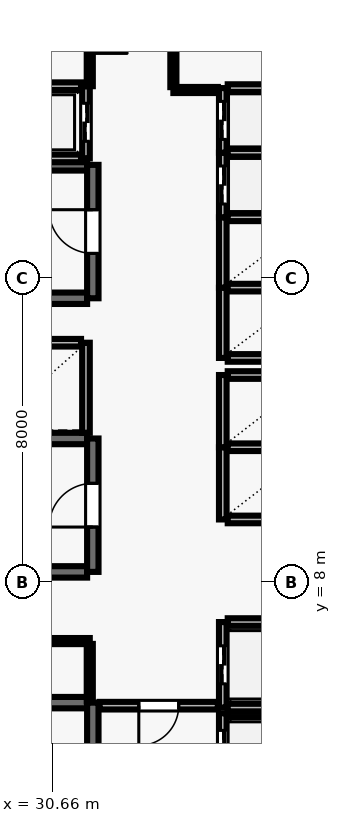
"""IFC4 building model, lengths in metres.
Left out: names, types, materials, properties, quantities, classifications, styles, units other than length and angle.
Written with IfcOpenShell. Run it as: python <this file> out.ifc"""

import sys

from ifc_helpers import new_model, si_unit, direction, frame, frame_2d, origin, place, context, subcontext, project, spatial, rectangle, extrude, element, fill, save


model = new_model("IFC4")
c1 = context("Model", 3, precision=1e-05, world=origin(), true_north=direction((0.0, 1.0)))
c2 = subcontext(c1, "Body", "Model", "MODEL_VIEW")
j1 = project(units=[si_unit("LENGTHUNIT", "METRE"), si_unit("PLANEANGLEUNIT", "RADIAN")], contexts=[c1])
p1 = place(None, origin())
s1 = spatial("IfcSite", under=j1, at=p1, CompositionType="ELEMENT")
p2 = place(p1, origin())
s2 = spatial("IfcBuilding", under=s1, at=p2, CompositionType="ELEMENT")
p3 = place(p2, frame((0.0, 0.0, 126.8)))
s3 = spatial("IfcBuildingStorey", under=s2, at=p3, CompositionType="ELEMENT", Elevation=126.8)
p4 = place(p3, frame((31.58, 4.83, 0.0), z_axis=(0.0, 0.0, 1.0), x_axis=(-1.0, 0.0, 0.0)))
e1 = element("IfcWall", 1, at=p4, inside=s3, PredefinedType="SHEAR", context=c2, shape_type="SweptSolid", body=[
    extrude(rectangle(XDim=8.36, YDim=0.3, at=frame_2d((4.18, 0.0))), origin(), (0.0, 0.0, 1.0), 3.69),
])
p5 = place(p3, frame((31.73, 0.96, 0.0), z_axis=(0.0, 0.0, 1.0), x_axis=(0.0, 1.0, 0.0)))
e2 = element("IfcWall", 2, at=p5, inside=s3, PredefinedType="SHEAR", context=c2, shape_type="SweptSolid", body=[
    extrude(rectangle(XDim=3.87, YDim=0.3, at=frame_2d((1.935, 0.0))), origin(), (0.0, 0.0, 1.0), 3.69),
])
p6 = place(p5, frame((1.54, 0.0, 0.0)))
e3 = element("IfcOpeningElement", 3, at=p6, cuts=e2, PredefinedType="OPENING", context=c2, shape_type="SweptSolid", body=[
    extrude(rectangle(XDim=1.15, YDim=2.15, at=frame_2d((0.575, 1.075))), frame((0.0, 0.16, 0.0), z_axis=(0.0, -1.0, 0.0), x_axis=(1.0, 0.0, 0.0)), (0.0, 0.0, 1.0), 0.32),
])
for number, where, z_axis, x_axis in (
    (4, (31.58, 18.98, 0.0), (0.0, 0.0, 1.0), (-1.0, 0.0, 0.0)),
    (5, (23.22, 15.47, 0.0), (0.0, 0.0, 1.0), (1.0, 0.0, 0.0)),
):
    element("IfcWall", number, at=place(p3, frame(where, z_axis=z_axis, x_axis=x_axis)), inside=s3, PredefinedType="SHEAR", context=c2, shape_type="SweptSolid", body=[
        extrude(rectangle(XDim=8.36, YDim=0.3, at=frame_2d((4.18, 0.0))), origin(), (0.0, 0.0, 1.0), 3.69),
    ])
p7 = place(p3, frame((31.73, 15.47, 0.0), z_axis=(0.0, 0.0, 1.0), x_axis=(0.0, 1.0, 0.0)))
e6 = element("IfcWall", 6, at=p7, inside=s3, PredefinedType="SHEAR", context=c2, shape_type="SweptSolid", body=[
    extrude(rectangle(XDim=3.51, YDim=0.3, at=frame_2d((1.755, 0.0))), origin(), (0.0, 0.0, 1.0), 3.69),
])
p8 = place(p7, frame((1.18, 0.0, 0.0)))
e7 = element("IfcOpeningElement", 7, at=p8, cuts=e6, PredefinedType="OPENING", context=c2, shape_type="SweptSolid", body=[
    extrude(rectangle(XDim=1.15, YDim=2.15, at=frame_2d((0.575, 1.075))), frame((0.0, 0.16, 0.0), z_axis=(0.0, -1.0, 0.0), x_axis=(1.0, 0.0, 0.0)), (0.0, 0.0, 1.0), 0.32),
])
for number, where, z_axis, x_axis in (
    (8, (31.58, 11.78, 0.0), (0.0, 0.0, 1.0), (-1.0, 0.0, 0.0)),
    (9, (23.22, 8.27, 0.0), (0.0, 0.0, 1.0), (1.0, 0.0, 0.0)),
):
    element("IfcWall", number, at=place(p3, frame(where, z_axis=z_axis, x_axis=x_axis)), inside=s3, PredefinedType="SHEAR", context=c2, shape_type="SweptSolid", body=[
        extrude(rectangle(XDim=8.36, YDim=0.3, at=frame_2d((4.18, 0.0))), origin(), (0.0, 0.0, 1.0), 3.69),
    ])
p9 = place(p3, frame((31.73, 8.27, 0.0), z_axis=(0.0, 0.0, 1.0), x_axis=(0.0, 1.0, 0.0)))
e10 = element("IfcWall", 10, at=p9, inside=s3, PredefinedType="SHEAR", context=c2, shape_type="SweptSolid", body=[
    extrude(rectangle(XDim=3.51, YDim=0.3, at=frame_2d((1.755, 0.0))), origin(), (0.0, 0.0, 1.0), 3.69),
])
p10 = place(p9, frame((1.18, 0.0, 0.0)))
e11 = element("IfcOpeningElement", 11, at=p10, cuts=e10, PredefinedType="OPENING", context=c2, shape_type="SweptSolid", body=[
    extrude(rectangle(XDim=1.15, YDim=2.15, at=frame_2d((0.575, 1.075))), frame((0.0, 0.16, 0.0), z_axis=(0.0, -1.0, 0.0), x_axis=(1.0, 0.0, 0.0)), (0.0, 0.0, 1.0), 0.32),
])
p11 = place(p3, frame((35.15, 4.55, 0.0), z_axis=(0.0, 0.0, 1.0), x_axis=(0.0, -1.0, 0.0)))
e12 = element("IfcWall", 12, at=p11, inside=s3, PredefinedType="SOLIDWALL", context=c2, shape_type="SweptSolid", body=[
    extrude(rectangle(XDim=2.1, YDim=0.2, at=frame_2d((1.05, 0.0))), origin(), (0.0, 0.0, 1.0), 3.69),
])
p12 = place(p11, frame((0.45, 0.0, 0.0)))
e13 = element("IfcOpeningElement", 13, at=p12, cuts=e12, PredefinedType="OPENING", context=c2, shape_type="SweptSolid", body=[
    extrude(rectangle(XDim=1.2, YDim=2.15, at=frame_2d((0.6, 1.075))), frame((0.0, 0.11, 0.0), z_axis=(0.0, -1.0, 0.0), x_axis=(1.0, 0.0, 0.0)), (0.0, 0.0, 1.0), 0.22),
])
p13 = place(p3, frame((37.42, 4.55, 0.0), z_axis=(0.0, 0.0, 1.0), x_axis=(-1.0, 0.0, 0.0)))
e14 = element("IfcWall", 14, at=p13, inside=s3, PredefinedType="SOLIDWALL", context=c2, shape_type="SweptSolid", body=[
    extrude(rectangle(XDim=2.14, YDim=0.2, at=frame_2d((1.07, 0.0))), origin(), (0.0, 0.0, 1.0), 3.69),
])
p14 = place(p3, frame((35.15, 6.95, 0.0), z_axis=(0.0, 0.0, 1.0), x_axis=(0.0, -1.0, 0.0)))
e15 = element("IfcWall", 15, at=p14, inside=s3, PredefinedType="SOLIDWALL", context=c2, shape_type="SweptSolid", body=[
    extrude(rectangle(XDim=2.25, YDim=0.2, at=frame_2d((1.125, 0.0))), origin(), (0.0, 0.0, 1.0), 3.69),
])
p15 = place(p14, frame((0.625, 0.0, 0.0)))
e16 = element("IfcOpeningElement", 16, at=p15, cuts=e15, PredefinedType="OPENING", context=c2, shape_type="SweptSolid", body=[
    extrude(rectangle(XDim=1.0, YDim=2.1, at=frame_2d((0.5, 1.05))), frame((0.0, 0.11, 0.0), z_axis=(0.0, -1.0, 0.0), x_axis=(1.0, 0.0, 0.0)), (0.0, 0.0, 1.0), 0.22),
])
for number, where, z_axis, x_axis in (
    (17, (35.28, 4.7, 0.0), (0.0, 0.0, 1.0), (1.0, 0.0, 0.0)),
    (18, (37.42, 6.95, 0.0), (0.0, 0.0, 1.0), (-1.0, 0.0, 0.0)),
):
    element("IfcWall", number, at=place(p3, frame(where, z_axis=z_axis, x_axis=x_axis)), inside=s3, PredefinedType="SOLIDWALL", context=c2, shape_type="SweptSolid", body=[
        extrude(rectangle(XDim=2.14, YDim=0.2, at=frame_2d((1.07, 0.0))), origin(), (0.0, 0.0, 1.0), 3.69),
    ])
p16 = place(p3, frame((35.15, 11.55, 0.0), z_axis=(0.0, 0.0, 1.0), x_axis=(0.0, -1.0, 0.0)))
e19 = element("IfcWall", 19, at=p16, inside=s3, PredefinedType="SOLIDWALL", context=c2, shape_type="SweptSolid", body=[
    extrude(rectangle(XDim=1.9, YDim=0.2, at=frame_2d((0.95, 0.0))), origin(), (0.0, 0.0, 1.0), 3.69),
])
for number, where, z_axis, x_axis in (
    (20, (35.28, 9.65, 0.0), (0.0, 0.0, 1.0), (1.0, 0.0, 0.0)),
    (21, (37.42, 11.55, 0.0), (0.0, 0.0, 1.0), (-1.0, 0.0, 0.0)),
):
    element("IfcWall", number, at=place(p3, frame(where, z_axis=z_axis, x_axis=x_axis)), inside=s3, PredefinedType="SOLIDWALL", context=c2, shape_type="SweptSolid", body=[
        extrude(rectangle(XDim=2.14, YDim=0.2, at=frame_2d((1.07, 0.0))), origin(), (0.0, 0.0, 1.0), 3.69),
    ])
p17 = place(p3, frame((35.15, 13.45, 0.0), z_axis=(0.0, 0.0, 1.0), x_axis=(0.0, -1.0, 0.0)))
e22 = element("IfcWall", 22, at=p17, inside=s3, PredefinedType="SOLIDWALL", context=c2, shape_type="SweptSolid", body=[
    extrude(rectangle(XDim=1.9, YDim=0.2, at=frame_2d((0.95, 0.0))), origin(), (0.0, 0.0, 1.0), 3.69),
])
p18 = place(p3, frame((37.42, 13.45, 0.0), z_axis=(0.0, 0.0, 1.0), x_axis=(-1.0, 0.0, 0.0)))
e23 = element("IfcWall", 23, at=p18, inside=s3, PredefinedType="SOLIDWALL", context=c2, shape_type="SweptSolid", body=[
    extrude(rectangle(XDim=2.14, YDim=0.2, at=frame_2d((1.07, 0.0))), origin(), (0.0, 0.0, 1.0), 3.69),
])
p19 = place(p3, frame((31.55, 11.93, 0.0), z_axis=(0.0, 0.0, 1.0), x_axis=(0.0, 1.0, 0.0)))
e24 = element("IfcWall", 24, at=p19, inside=s3, PredefinedType="SOLIDWALL", context=c2, shape_type="SweptSolid", body=[
    extrude(rectangle(XDim=2.37, YDim=0.2, at=frame_2d((1.185, 0.0))), origin(), (0.0, 0.0, 1.0), 3.69),
])
p20 = place(p3, frame((31.42, 14.3, 0.0), z_axis=(0.0, 0.0, 1.0), x_axis=(-1.0, 0.0, 0.0)))
e25 = element("IfcWall", 25, at=p20, inside=s3, PredefinedType="SOLIDWALL", context=c2, shape_type="SweptSolid", body=[
    extrude(rectangle(XDim=2.44, YDim=0.2, at=frame_2d((1.22, 0.0))), origin(), (0.0, 0.0, 1.0), 3.69),
])
p21 = place(p3, frame((35.15, 15.75, 0.0), z_axis=(0.0, 0.0, 1.0), x_axis=(0.0, -1.0, 0.0)))
e26 = element("IfcWall", 26, at=p21, inside=s3, PredefinedType="SOLIDWALL", context=c2, shape_type="SweptSolid", body=[
    extrude(rectangle(XDim=1.85, YDim=0.2, at=frame_2d((0.925, 0.0))), origin(), (0.0, 0.0, 1.0), 3.69),
])
for number, where, z_axis, x_axis in (
    (27, (35.28, 13.9, 0.0), (0.0, 0.0, 1.0), (1.0, 0.0, 0.0)),
    (28, (37.42, 15.75, 0.0), (0.0, 0.0, 1.0), (-1.0, 0.0, 0.0)),
):
    element("IfcWall", number, at=place(p3, frame(where, z_axis=z_axis, x_axis=x_axis)), inside=s3, PredefinedType="SOLIDWALL", context=c2, shape_type="SweptSolid", body=[
        extrude(rectangle(XDim=2.14, YDim=0.2, at=frame_2d((1.07, 0.0))), origin(), (0.0, 0.0, 1.0), 3.69),
    ])
p22 = place(p3, frame((35.15, 17.6, 0.0), z_axis=(0.0, 0.0, 1.0), x_axis=(0.0, -1.0, 0.0)))
e29 = element("IfcWall", 29, at=p22, inside=s3, PredefinedType="SOLIDWALL", context=c2, shape_type="SweptSolid", body=[
    extrude(rectangle(XDim=1.85, YDim=0.2, at=frame_2d((0.925, 0.0))), origin(), (0.0, 0.0, 1.0), 3.69),
])
p23 = place(p3, frame((37.42, 17.6, 0.0), z_axis=(0.0, 0.0, 1.0), x_axis=(-1.0, 0.0, 0.0)))
e30 = element("IfcWall", 30, at=p23, inside=s3, PredefinedType="SOLIDWALL", context=c2, shape_type="SweptSolid", body=[
    extrude(rectangle(XDim=2.14, YDim=0.2, at=frame_2d((1.07, 0.0))), origin(), (0.0, 0.0, 1.0), 3.69),
])
p24 = place(p3, frame((35.15, 19.3, 0.0), z_axis=(0.0, 0.0, 1.0), x_axis=(0.0, -1.0, 0.0)))
e31 = element("IfcWall", 31, at=p24, inside=s3, PredefinedType="SOLIDWALL", context=c2, shape_type="SweptSolid", body=[
    extrude(rectangle(XDim=1.7, YDim=0.2, at=frame_2d((0.85, 0.0))), origin(), (0.0, 0.0, 1.0), 3.69),
])
p25 = place(p24, frame((0.35, 0.0, 0.0)))
e32 = element("IfcOpeningElement", 32, at=p25, cuts=e31, PredefinedType="OPENING", context=c2, shape_type="SweptSolid", body=[
    extrude(rectangle(XDim=1.0, YDim=2.1, at=frame_2d((0.5, 1.05))), frame((0.0, 0.11, 0.0), z_axis=(0.0, -1.0, 0.0), x_axis=(1.0, 0.0, 0.0)), (0.0, 0.0, 1.0), 0.22),
])
p26 = place(p3, frame((37.42, 19.3, 0.0), z_axis=(0.0, 0.0, 1.0), x_axis=(-1.0, 0.0, 0.0)))
e33 = element("IfcWall", 33, at=p26, inside=s3, PredefinedType="SOLIDWALL", context=c2, shape_type="SweptSolid", body=[
    extrude(rectangle(XDim=2.14, YDim=0.2, at=frame_2d((1.07, 0.0))), origin(), (0.0, 0.0, 1.0), 3.69),
])
p27 = place(p3, frame((35.15, 21.0, 0.0), z_axis=(0.0, 0.0, 1.0), x_axis=(0.0, -1.0, 0.0)))
e34 = element("IfcWall", 34, at=p27, inside=s3, PredefinedType="SOLIDWALL", context=c2, shape_type="SweptSolid", body=[
    extrude(rectangle(XDim=1.7, YDim=0.2, at=frame_2d((0.85, 0.0))), origin(), (0.0, 0.0, 1.0), 3.69),
])
p28 = place(p27, frame((0.35, 0.0, 0.0)))
e35 = element("IfcOpeningElement", 35, at=p28, cuts=e34, PredefinedType="OPENING", context=c2, shape_type="SweptSolid", body=[
    extrude(rectangle(XDim=1.0, YDim=2.1, at=frame_2d((0.5, 1.05))), frame((0.0, 0.11, 0.0), z_axis=(0.0, -1.0, 0.0), x_axis=(1.0, 0.0, 0.0)), (0.0, 0.0, 1.0), 0.22),
])
p29 = place(p3, frame((37.42, 21.0, 0.0), z_axis=(0.0, 0.0, 1.0), x_axis=(-1.0, 0.0, 0.0)))
e36 = element("IfcWall", 36, at=p29, inside=s3, PredefinedType="SOLIDWALL", context=c2, shape_type="SweptSolid", body=[
    extrude(rectangle(XDim=2.14, YDim=0.2, at=frame_2d((1.07, 0.0))), origin(), (0.0, 0.0, 1.0), 3.69),
])
p30 = place(p3, frame((31.55, 19.15, 0.0), z_axis=(0.0, 0.0, 1.0), x_axis=(0.0, 1.0, 0.0)))
e37 = element("IfcWall", 37, at=p30, inside=s3, PredefinedType="SOLIDWALL", context=c2, shape_type="SweptSolid", body=[
    extrude(rectangle(XDim=1.9, YDim=0.2, at=frame_2d((0.95, 0.0))), origin(), (0.0, 0.0, 1.0), 3.69),
])
p31 = place(p30, frame((0.45, 0.0, 0.0)))
e38 = element("IfcOpeningElement", 38, at=p31, cuts=e37, PredefinedType="OPENING", context=c2, shape_type="SweptSolid", body=[
    extrude(rectangle(XDim=1.0, YDim=2.1, at=frame_2d((0.5, 1.05))), frame((0.0, 0.11, 0.0), z_axis=(0.0, -1.0, 0.0), x_axis=(1.0, 0.0, 0.0)), (0.0, 0.0, 1.0), 0.22),
])
for number, where, z_axis, x_axis in (
    (39, (28.98, 19.15, 0.0), (0.0, 0.0, 1.0), (1.0, 0.0, 0.0)),
    (40, (31.42, 21.05, 0.0), (0.0, 0.0, 1.0), (-1.0, 0.0, 0.0)),
):
    element("IfcWall", number, at=place(p3, frame(where, z_axis=z_axis, x_axis=x_axis)), inside=s3, PredefinedType="SOLIDWALL", context=c2, shape_type="SweptSolid", body=[
        extrude(rectangle(XDim=2.44, YDim=0.2, at=frame_2d((1.22, 0.0))), origin(), (0.0, 0.0, 1.0), 3.69),
    ])
p32 = place(p3, frame((28.55, 6.45, 0.0), z_axis=(0.0, 0.0, 1.0), x_axis=(1.0, 0.0, 0.0)))
e41 = element("IfcWall", 41, at=p32, inside=s3, PredefinedType="PARTITIONING", context=c2, shape_type="SweptSolid", body=[
    extrude(rectangle(XDim=3.1, YDim=0.16, at=frame_2d((1.55, 0.0))), origin(), (0.0, 0.0, 1.0), 3.69),
])
p33 = place(p32, frame((1.11, 0.0, 0.0)))
e42 = element("IfcOpeningElement", 42, at=p33, cuts=e41, PredefinedType="OPENING", context=c2, shape_type="SweptSolid", body=[
    extrude(rectangle(XDim=0.88, YDim=2.1, at=frame_2d((0.44, 1.05))), frame((0.0, 0.09, 0.0), z_axis=(0.0, -1.0, 0.0), x_axis=(1.0, 0.0, 0.0)), (0.0, 0.0, 1.0), 0.18),
])
p34 = place(p3, frame((35.02, 4.75, 0.0), z_axis=(0.0, 0.0, 1.0), x_axis=(-1.0, 0.0, 0.0)))
e43 = element("IfcWall", 43, at=p34, inside=s3, PredefinedType="SOLIDWALL", context=c2, shape_type="SweptSolid", body=[
    extrude(rectangle(XDim=3.11, YDim=0.2, at=frame_2d((1.555, 0.0))), origin(), (0.0, 0.0, 1.0), 3.69),
])
p35 = place(p34, frame((1.03, 0.0, 0.0)))
e44 = element("IfcOpeningElement", 44, at=p35, cuts=e43, PredefinedType="OPENING", context=c2, shape_type="SweptSolid", body=[
    extrude(rectangle(XDim=1.05, YDim=2.15, at=frame_2d((0.525, 1.075))), frame((0.0, 0.11, 0.0), z_axis=(0.0, -1.0, 0.0), x_axis=(1.0, 0.0, 0.0)), (0.0, 0.0, 1.0), 0.22),
])
p36 = place(p3, frame((35.02, 20.95, 0.0), z_axis=(0.0, 0.0, 1.0), x_axis=(-1.0, 0.0, 0.0)))
e45 = element("IfcWall", 45, at=p36, inside=s3, PredefinedType="PARTITIONING", context=c2, shape_type="SweptSolid", body=[
    extrude(rectangle(XDim=1.17, YDim=0.16, at=frame_2d((0.585, 0.0))), origin(), (0.0, 0.0, 1.0), 3.69),
])
p37 = place(p3, frame((31.65, 4.86, 0.0), z_axis=(0.0, 0.0, 1.0), x_axis=(0.0, 1.0, 0.0)))
e46 = element("IfcWall", 46, at=p37, inside=s3, PredefinedType="PARTITIONING", context=c2, shape_type="SweptSolid", body=[
    extrude(rectangle(XDim=1.515, YDim=0.16, at=frame_2d((0.757, 0.0))), origin(), (0.0, 0.0, 1.0), 3.69),
])
p38 = place(p3, frame((31.65, 23.775, 0.0), z_axis=(0.0, 0.0, 1.0), x_axis=(0.0, -1.0, 0.0)))
e47 = element("IfcWall", 47, at=p38, inside=s3, PredefinedType="PARTITIONING", context=c2, shape_type="SweptSolid", body=[
    extrude(rectangle(XDim=2.725, YDim=0.16, at=frame_2d((1.362, 0.0))), origin(), (0.0, 0.0, 1.0), 3.69),
])
p39 = place(p38, frame((0.862, 0.0, 0.0)))
e48 = element("IfcOpeningElement", 48, at=p39, cuts=e47, PredefinedType="OPENING", context=c2, shape_type="SweptSolid", body=[
    extrude(rectangle(XDim=1.0, YDim=2.1, at=frame_2d((0.5, 1.05))), frame((0.0, 0.09, 0.0), z_axis=(0.0, -1.0, 0.0), x_axis=(1.0, 0.0, 0.0)), (0.0, 0.0, 1.0), 0.18),
])
p40 = place(p3, frame((33.85, 21.025, 0.0), z_axis=(0.0, 0.0, 1.0), x_axis=(0.0, 1.0, 0.0)))
e49 = element("IfcWall", 49, at=p40, inside=s3, PredefinedType="PARTITIONING", context=c2, shape_type="SweptSolid", body=[
    extrude(rectangle(XDim=2.75, YDim=0.16, at=frame_2d((1.375, 0.0))), origin(), (0.0, 0.0, 1.0), 3.69),
])
p41 = place(p8, origin())
e50 = element("IfcDoor", 50, at=p41, inside=s3, OperationType="SINGLE_SWING_RIGHT", PredefinedType="DOOR", context=c2, shape_type="SweptSolid", body=[
    extrude(rectangle(XDim=1.15, YDim=2.15, at=frame_2d((0.575, 1.075))), frame((0.0, 0.025, 0.0), z_axis=(0.0, -1.0, 0.0), x_axis=(1.0, 0.0, 0.0)), (0.0, 0.0, 1.0), 0.05),
])
fill(e7, e50)
p42 = place(p10, origin())
e51 = element("IfcDoor", 51, at=p42, inside=s3, OperationType="SINGLE_SWING_LEFT", PredefinedType="DOOR", context=c2, shape_type="SweptSolid", body=[
    extrude(rectangle(XDim=1.15, YDim=2.15, at=frame_2d((0.575, 1.075))), frame((0.0, 0.025, 0.0), z_axis=(0.0, -1.0, 0.0), x_axis=(1.0, 0.0, 0.0)), (0.0, 0.0, 1.0), 0.05),
])
fill(e11, e51)
p43 = place(p12, origin())
e52 = element("IfcDoor", 52, at=p43, inside=s3, OperationType="DOUBLE_DOOR_SLIDING", PredefinedType="DOOR", context=c2, shape_type="SweptSolid", body=[
    extrude(rectangle(XDim=1.2, YDim=2.15, at=frame_2d((0.6, 1.075))), frame((0.0, 0.025, 0.0), z_axis=(0.0, -1.0, 0.0), x_axis=(1.0, 0.0, 0.0)), (0.0, 0.0, 1.0), 0.05),
])
fill(e13, e52)
p44 = place(p15, origin())
e53 = element("IfcDoor", 53, at=p44, inside=s3, OperationType="DOUBLE_DOOR_SLIDING", PredefinedType="DOOR", context=c2, shape_type="SweptSolid", body=[
    extrude(rectangle(XDim=1.0, YDim=2.1, at=frame_2d((0.5, 1.05))), frame((0.0, 0.025, 0.0), z_axis=(0.0, -1.0, 0.0), x_axis=(1.0, 0.0, 0.0)), (0.0, 0.0, 1.0), 0.05),
])
fill(e16, e53)
p45 = place(p25, origin())
e54 = element("IfcDoor", 54, at=p45, inside=s3, OperationType="DOUBLE_DOOR_SLIDING", PredefinedType="DOOR", context=c2, shape_type="SweptSolid", body=[
    extrude(rectangle(XDim=1.0, YDim=2.1, at=frame_2d((0.5, 1.05))), frame((0.0, 0.025, 0.0), z_axis=(0.0, -1.0, 0.0), x_axis=(1.0, 0.0, 0.0)), (0.0, 0.0, 1.0), 0.05),
])
fill(e32, e54)
p46 = place(p28, origin())
e55 = element("IfcDoor", 55, at=p46, inside=s3, OperationType="DOUBLE_DOOR_SLIDING", PredefinedType="DOOR", context=c2, shape_type="SweptSolid", body=[
    extrude(rectangle(XDim=1.0, YDim=2.1, at=frame_2d((0.5, 1.05))), frame((0.0, 0.025, 0.0), z_axis=(0.0, -1.0, 0.0), x_axis=(1.0, 0.0, 0.0)), (0.0, 0.0, 1.0), 0.05),
])
fill(e35, e55)
p47 = place(p31, origin())
e56 = element("IfcDoor", 56, at=p47, inside=s3, OperationType="DOUBLE_DOOR_SLIDING", PredefinedType="DOOR", context=c2, shape_type="SweptSolid", body=[
    extrude(rectangle(XDim=1.0, YDim=2.1, at=frame_2d((0.5, 1.05))), frame((0.0, 0.025, 0.0), z_axis=(0.0, -1.0, 0.0), x_axis=(1.0, 0.0, 0.0)), (0.0, 0.0, 1.0), 0.05),
])
fill(e38, e56)
p48 = place(p35, origin())
e57 = element("IfcDoor", 57, at=p48, inside=s3, OperationType="SINGLE_SWING_RIGHT", PredefinedType="DOOR", context=c2, shape_type="SweptSolid", body=[
    extrude(rectangle(XDim=1.05, YDim=2.15, at=frame_2d((0.525, 1.075))), frame((0.0, 0.025, 0.0), z_axis=(0.0, -1.0, 0.0), x_axis=(1.0, 0.0, 0.0)), (0.0, 0.0, 1.0), 0.05),
])
fill(e44, e57)
p49 = place(p39, origin())
e58 = element("IfcDoor", 58, at=p49, inside=s3, OperationType="SINGLE_SWING_RIGHT", PredefinedType="DOOR", context=c2, shape_type="SweptSolid", body=[
    extrude(rectangle(XDim=1.0, YDim=2.1, at=frame_2d((0.5, 1.05))), frame((0.0, 0.025, 0.0), z_axis=(0.0, -1.0, 0.0), x_axis=(1.0, 0.0, 0.0)), (0.0, 0.0, 1.0), 0.05),
])
fill(e48, e58)
save(model, sys.argv[1])
